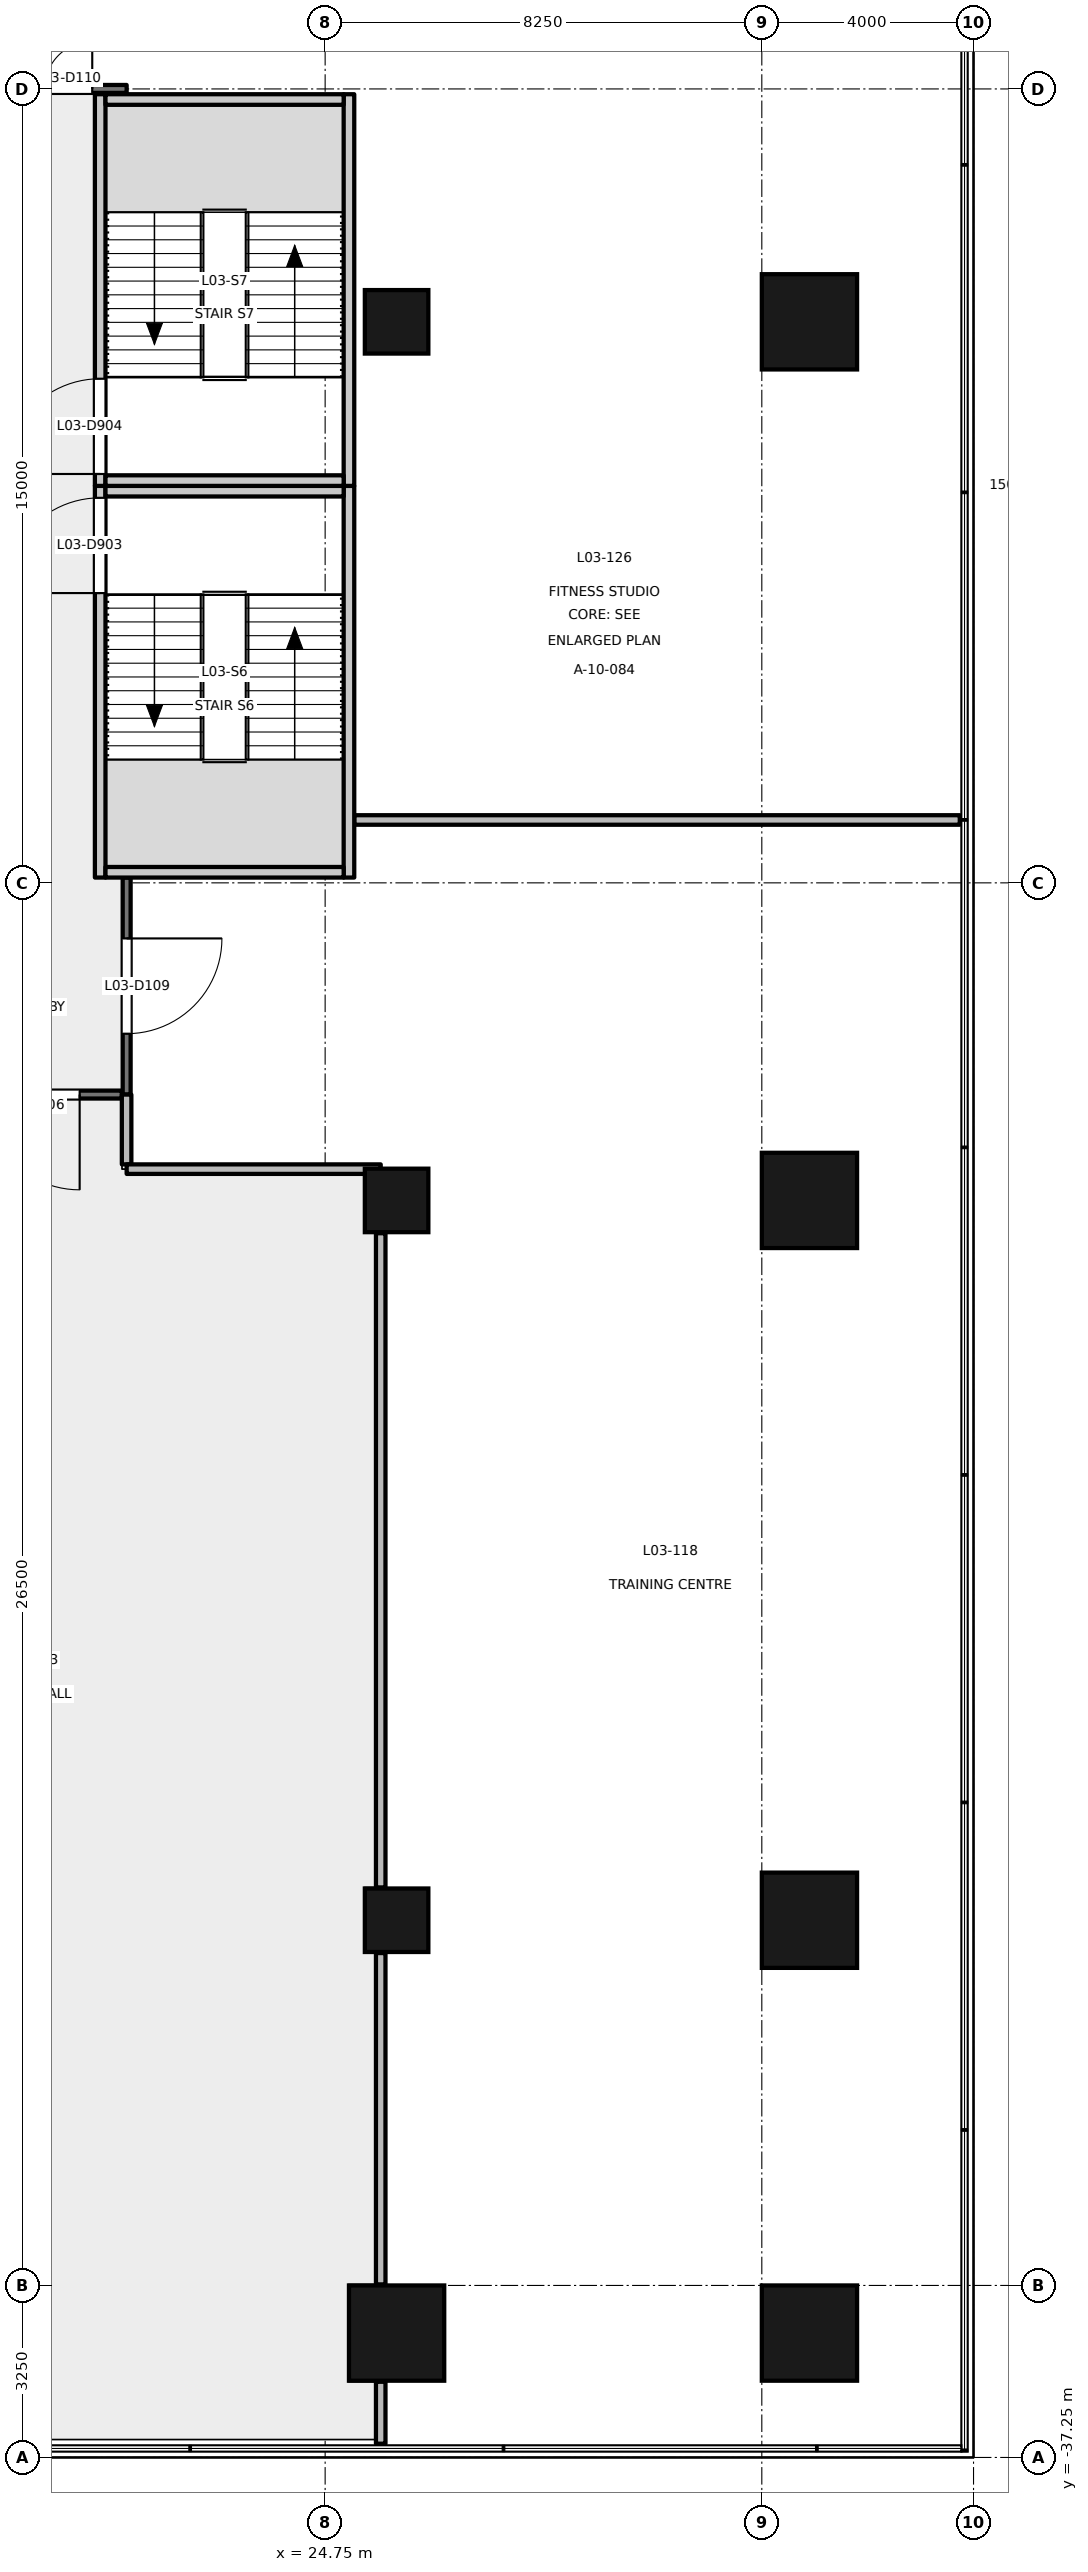
"""IFC4 building model, lengths in metres.
Left out: names, types, materials, properties, quantities, classifications, styles, units other than length and angle.
Written with IfcOpenShell. Run it as: python <this file> out.ifc"""

import sys

from ifc_helpers import new_model, si_unit, direction, frame, frame_2d, origin, origin_2d, place, context, subcontext, project, spatial, rectangle, extrude, element, fill, save


model = new_model("IFC4")
c1 = context("Model", 3, precision=1e-05, world=origin(), true_north=direction((0.0, 1.0)))
c2 = subcontext(c1, "Body", "Model", "MODEL_VIEW")
j1 = project(units=[si_unit("LENGTHUNIT", "METRE"), si_unit("PLANEANGLEUNIT", "RADIAN")], contexts=[c1])
p1 = place(None, origin())
s1 = spatial("IfcSite", under=j1, at=p1, CompositionType="ELEMENT")
p2 = place(p1, origin())
s2 = spatial("IfcBuilding", under=s1, at=p2, CompositionType="ELEMENT")
p3 = place(p2, frame((0.0, 0.0, 17.4)))
s3 = spatial("IfcBuildingStorey", under=s2, at=p3, CompositionType="ELEMENT", Elevation=17.4)
for number, where, z_axis, x_axis in (
    (1, (33.9, -34.9, -0.2), (0.0, 0.0, 1.0), (1.0, 0.0, 0.0)),
    (2, (26.1, -34.9, -0.2), (0.0, 0.0, 1.0), (1.0, 0.0, 0.0)),
    (3, (33.9, -27.1, -0.2), (0.0, 0.0, 1.0), (0.0, 1.0, 0.0)),
    (4, (33.9, -13.5, -0.2), (0.0, 0.0, 1.0), (0.0, 1.0, 0.0)),
    (5, (33.9, 3.1, -0.2), (0.0, 0.0, 1.0), (0.0, 1.0, 0.0)),
):
    element("IfcColumn", number, at=place(p3, frame(where, z_axis=z_axis, x_axis=x_axis)), inside=s3, PredefinedType="COLUMN", context=c2, shape_type="SweptSolid", body=[
        extrude(rectangle(XDim=1.8, YDim=1.8, at=origin_2d()), origin(), (0.0, 0.0, 1.0), 4.8),
    ])
for number, where, z_axis, x_axis in (
    (6, (26.1, -27.1, -0.2), (0.0, 0.0, 1.0), (1.0, 0.0, 0.0)),
    (7, (26.1, -13.5, -0.2), (0.0, 0.0, 1.0), (1.0, 0.0, 0.0)),
    (8, (26.1, 3.1, -0.2), (0.0, 0.0, 1.0), (1.0, 0.0, 0.0)),
):
    element("IfcColumn", number, at=place(p3, frame(where, z_axis=z_axis, x_axis=x_axis)), inside=s3, PredefinedType="COLUMN", context=c2, shape_type="SweptSolid", body=[
        extrude(rectangle(XDim=1.2, YDim=1.2, at=origin_2d()), origin(), (0.0, 0.0, 1.0), 4.8),
    ])
p4 = place(p3, frame((20.5, -7.4, -0.2), z_axis=(0.0, 0.0, 1.0), x_axis=(0.0, 1.0, 0.0)))
e9 = element("IfcWall", 9, at=p4, inside=s3, PredefinedType="SHEAR", context=c2, shape_type="SweptSolid", body=[
    extrude(rectangle(XDim=7.4, YDim=0.2, at=frame_2d((3.7, 0.0))), origin(), (0.0, 0.0, 1.0), 4.8),
])
p5 = place(p4, frame((5.375, 0.0, 0.2)))
e10 = element("IfcOpeningElement", 10, at=p5, cuts=e9, PredefinedType="OPENING", context=c2, shape_type="SweptSolid", body=[
    extrude(rectangle(XDim=1.8, YDim=2.1, at=frame_2d((0.9, 1.05))), frame((0.0, 0.111, 0.0), z_axis=(0.0, -1.0, 0.0), x_axis=(1.0, 0.0, 0.0)), (0.0, 0.0, 1.0), 0.221),
])
p6 = place(p3, frame((25.2, -7.4, -0.2), z_axis=(0.0, 0.0, 1.0), x_axis=(0.0, 1.0, 0.0)))
e11 = element("IfcWall", 11, at=p6, inside=s3, PredefinedType="SHEAR", context=c2, shape_type="SweptSolid", body=[
    extrude(rectangle(XDim=7.4, YDim=0.2, at=frame_2d((3.7, 0.0))), origin(), (0.0, 0.0, 1.0), 4.8),
])
for number, where, z_axis, x_axis in (
    (12, (20.6, -0.1, -0.2), (0.0, 0.0, 1.0), (1.0, 0.0, 0.0)),
    (13, (20.6, -7.3, -0.2), (0.0, 0.0, 1.0), (1.0, 0.0, 0.0)),
):
    element("IfcWall", number, at=place(p3, frame(where, z_axis=z_axis, x_axis=x_axis)), inside=s3, PredefinedType="SHEAR", context=c2, shape_type="SweptSolid", body=[
        extrude(rectangle(XDim=4.5, YDim=0.2, at=frame_2d((2.25, 0.0))), origin(), (0.0, 0.0, 1.0), 4.8),
    ])
p7 = place(p3, frame((20.5, 0.0, -0.2), z_axis=(0.0, 0.0, 1.0), x_axis=(0.0, 1.0, 0.0)))
e14 = element("IfcWall", 14, at=p7, inside=s3, PredefinedType="SHEAR", context=c2, shape_type="SweptSolid", body=[
    extrude(rectangle(XDim=7.4, YDim=0.2, at=frame_2d((3.7, 0.0))), origin(), (0.0, 0.0, 1.0), 4.8),
])
p8 = place(p7, frame((0.225, 0.0, 0.2)))
e15 = element("IfcOpeningElement", 15, at=p8, cuts=e14, PredefinedType="OPENING", context=c2, shape_type="SweptSolid", body=[
    extrude(rectangle(XDim=1.8, YDim=2.1, at=frame_2d((0.9, 1.05))), frame((0.0, 0.111, 0.0), z_axis=(0.0, -1.0, 0.0), x_axis=(1.0, 0.0, 0.0)), (0.0, 0.0, 1.0), 0.221),
])
p9 = place(p3, frame((25.2, 0.0, -0.2), z_axis=(0.0, 0.0, 1.0), x_axis=(0.0, 1.0, 0.0)))
e16 = element("IfcWall", 16, at=p9, inside=s3, PredefinedType="SHEAR", context=c2, shape_type="SweptSolid", body=[
    extrude(rectangle(XDim=7.4, YDim=0.2, at=frame_2d((3.7, 0.0))), origin(), (0.0, 0.0, 1.0), 4.8),
])
for number, where, z_axis, x_axis in (
    (17, (20.6, 7.3, -0.2), (0.0, 0.0, 1.0), (1.0, 0.0, 0.0)),
    (18, (20.6, 0.1, -0.2), (0.0, 0.0, 1.0), (1.0, 0.0, 0.0)),
):
    element("IfcWall", number, at=place(p3, frame(where, z_axis=z_axis, x_axis=x_axis)), inside=s3, PredefinedType="SHEAR", context=c2, shape_type="SweptSolid", body=[
        extrude(rectangle(XDim=4.5, YDim=0.2, at=frame_2d((2.25, 0.0))), origin(), (0.0, 0.0, 1.0), 4.8),
    ])
p10 = place(p3, frame((20.909, -11.5, 0.0), z_axis=(0.0, 0.0, 1.0), x_axis=(-1.0, 0.0, 0.0)))
e19 = element("IfcWall", 19, at=p10, inside=s3, PredefinedType="PARTITIONING", context=c2, shape_type="SweptSolid", body=[
    extrude(rectangle(XDim=4.489, YDim=0.15, at=frame_2d((2.245, 0.0))), origin(), (0.0, 0.0, 1.0), 4.3),
])
p11 = place(p10, frame((0.797, 0.0, 0.0)))
e20 = element("IfcOpeningElement", 20, at=p11, cuts=e19, PredefinedType="OPENING", context=c2, shape_type="SweptSolid", body=[
    extrude(rectangle(XDim=1.8, YDim=2.1, at=frame_2d((0.9, 1.05))), frame((0.0, 0.085, 0.0), z_axis=(0.0, -1.0, 0.0), x_axis=(1.0, 0.0, 0.0)), (0.0, 0.0, 1.0), 0.171),
])
p12 = place(p3, frame((21.0, -7.4, 0.0), z_axis=(0.0, 0.0, 1.0), x_axis=(0.0, -1.0, 0.0)))
e21 = element("IfcWall", 21, at=p12, inside=s3, PredefinedType="PARTITIONING", context=c2, shape_type="SweptSolid", body=[
    extrude(rectangle(XDim=4.1, YDim=0.15, at=frame_2d((2.05, 0.0))), origin(), (0.0, 0.0, 1.0), 4.6),
])
p13 = place(p12, frame((1.15, 0.0, 0.0)))
e22 = element("IfcOpeningElement", 22, at=p13, cuts=e21, PredefinedType="OPENING", context=c2, shape_type="SweptSolid", body=[
    extrude(rectangle(XDim=1.8, YDim=2.1, at=frame_2d((0.9, 1.05))), frame((0.0, 0.085, 0.0), z_axis=(0.0, -1.0, 0.0), x_axis=(1.0, 0.0, 0.0)), (0.0, 0.0, 1.0), 0.171),
])
p14 = place(p3, frame((18.0, 7.5, 0.0), z_axis=(0.0, 0.0, 1.0), x_axis=(1.0, 0.0, 0.0)))
e23 = element("IfcWall", 23, at=p14, inside=s3, PredefinedType="PARTITIONING", context=c2, shape_type="SweptSolid", body=[
    extrude(rectangle(XDim=3.0, YDim=0.15, at=frame_2d((1.5, 0.0))), origin(), (0.0, 0.0, 1.0), 4.3),
])
p15 = place(p14, frame((1.45, 0.0, 0.0)))
e24 = element("IfcOpeningElement", 24, at=p15, cuts=e23, PredefinedType="OPENING", context=c2, shape_type="SweptSolid", body=[
    extrude(rectangle(XDim=0.9, YDim=2.1, at=frame_2d((0.45, 1.05))), frame((0.0, 0.085, 0.0), z_axis=(0.0, -1.0, 0.0), x_axis=(1.0, 0.0, 0.0)), (0.0, 0.0, 1.0), 0.171),
])
p16 = place(p3, frame((20.999, -11.5, 0.0), z_axis=(0.0, 0.0, 1.0), x_axis=(0.0, -1.0, 0.0)))
e25 = element("IfcWall", 25, at=p16, inside=s3, PredefinedType="PARTITIONING", context=c2, shape_type="SweptSolid", body=[
    extrude(rectangle(XDim=1.319, YDim=0.18, at=frame_2d((0.66, 0.0))), origin(), (0.0, 0.0, 1.0), 4.6),
])
p17 = place(p3, frame((21.0, -12.909, 0.0), z_axis=(0.0, 0.0, 1.0), x_axis=(1.0, 0.0, 0.0)))
e26 = element("IfcWall", 26, at=p17, inside=s3, PredefinedType="PARTITIONING", context=c2, shape_type="SweptSolid", body=[
    extrude(rectangle(XDim=4.8, YDim=0.18, at=frame_2d((2.4, 0.0))), origin(), (0.0, 0.0, 1.0), 4.3),
])
p18 = place(p3, frame((25.8, -35.82, 0.0), z_axis=(0.0, 0.0, 1.0), x_axis=(0.0, -1.0, 0.0)))
e27 = element("IfcWall", 27, at=p18, inside=s3, PredefinedType="PARTITIONING", context=c2, shape_type="SweptSolid", body=[
    extrude(rectangle(XDim=1.17, YDim=0.18, at=frame_2d((0.585, 0.0))), origin(), (0.0, 0.0, 1.0), 4.6),
])
p19 = place(p3, frame((25.8, -27.72, 0.0), z_axis=(0.0, 0.0, 1.0), x_axis=(0.0, -1.0, 0.0)))
e28 = element("IfcWall", 28, at=p19, inside=s3, PredefinedType="PARTITIONING", context=c2, shape_type="SweptSolid", body=[
    extrude(rectangle(XDim=6.26, YDim=0.18, at=frame_2d((3.13, 0.0))), origin(), (0.0, 0.0, 1.0), 4.6),
])
p20 = place(p3, frame((25.8, -14.12, 0.0), z_axis=(0.0, 0.0, 1.0), x_axis=(0.0, -1.0, 0.0)))
e29 = element("IfcWall", 29, at=p20, inside=s3, PredefinedType="PARTITIONING", context=c2, shape_type="SweptSolid", body=[
    extrude(rectangle(XDim=12.36, YDim=0.18, at=frame_2d((6.18, 0.0))), origin(), (0.0, 0.0, 1.0), 4.6),
])
p21 = place(p3, frame((25.3, -6.312, 0.0), z_axis=(0.0, 0.0, 1.0), x_axis=(1.0, 0.0, 0.0)))
e30 = element("IfcWall", 30, at=p21, inside=s3, PredefinedType="PARTITIONING", context=c2, shape_type="SweptSolid", body=[
    extrude(rectangle(XDim=11.44, YDim=0.18, at=frame_2d((5.72, 0.0))), origin(), (0.0, 0.0, 1.0), 3.4),
])
p22 = place(p5, origin())
e31 = element("IfcDoor", 31, at=p22, inside=s3, OperationType="DOUBLE_DOOR_SINGLE_SWING", PredefinedType="DOOR", context=c2, shape_type="SweptSolid", body=[
    extrude(rectangle(XDim=1.8, YDim=2.1, at=frame_2d((0.9, 1.05))), frame((0.0, 0.025, 0.0), z_axis=(0.0, -1.0, 0.0), x_axis=(1.0, 0.0, 0.0)), (0.0, 0.0, 1.0), 0.05),
])
fill(e10, e31)
p23 = place(p8, origin())
e32 = element("IfcDoor", 32, at=p23, inside=s3, OperationType="DOUBLE_DOOR_SINGLE_SWING", PredefinedType="DOOR", context=c2, shape_type="SweptSolid", body=[
    extrude(rectangle(XDim=1.8, YDim=2.1, at=frame_2d((0.9, 1.05))), frame((0.0, 0.025, 0.0), z_axis=(0.0, -1.0, 0.0), x_axis=(1.0, 0.0, 0.0)), (0.0, 0.0, 1.0), 0.05),
])
fill(e15, e32)
p24 = place(p11, origin())
e33 = element("IfcDoor", 33, at=p24, inside=s3, OperationType="DOUBLE_DOOR_SINGLE_SWING", PredefinedType="DOOR", context=c2, shape_type="SweptSolid", body=[
    extrude(rectangle(XDim=1.8, YDim=2.1, at=frame_2d((0.9, 1.05))), frame((0.0, 0.025, 0.0), z_axis=(0.0, -1.0, 0.0), x_axis=(1.0, 0.0, 0.0)), (0.0, 0.0, 1.0), 0.05),
])
fill(e20, e33)
p25 = place(p13, origin())
e34 = element("IfcDoor", 34, at=p25, inside=s3, OperationType="DOUBLE_DOOR_SINGLE_SWING", PredefinedType="DOOR", context=c2, shape_type="SweptSolid", body=[
    extrude(rectangle(XDim=1.8, YDim=2.1, at=frame_2d((0.9, 1.05))), frame((0.0, 0.025, 0.0), z_axis=(0.0, -1.0, 0.0), x_axis=(1.0, 0.0, 0.0)), (0.0, 0.0, 1.0), 0.05),
])
fill(e22, e34)
p26 = place(p15, origin())
e35 = element("IfcDoor", 35, at=p26, inside=s3, OperationType="SINGLE_SWING_RIGHT", PredefinedType="DOOR", context=c2, shape_type="SweptSolid", body=[
    extrude(rectangle(XDim=0.9, YDim=2.1, at=frame_2d((0.45, 1.05))), frame((0.0, 0.025, 0.0), z_axis=(0.0, -1.0, 0.0), x_axis=(1.0, 0.0, 0.0)), (0.0, 0.0, 1.0), 0.05),
])
fill(e24, e35)
save(model, sys.argv[1])
